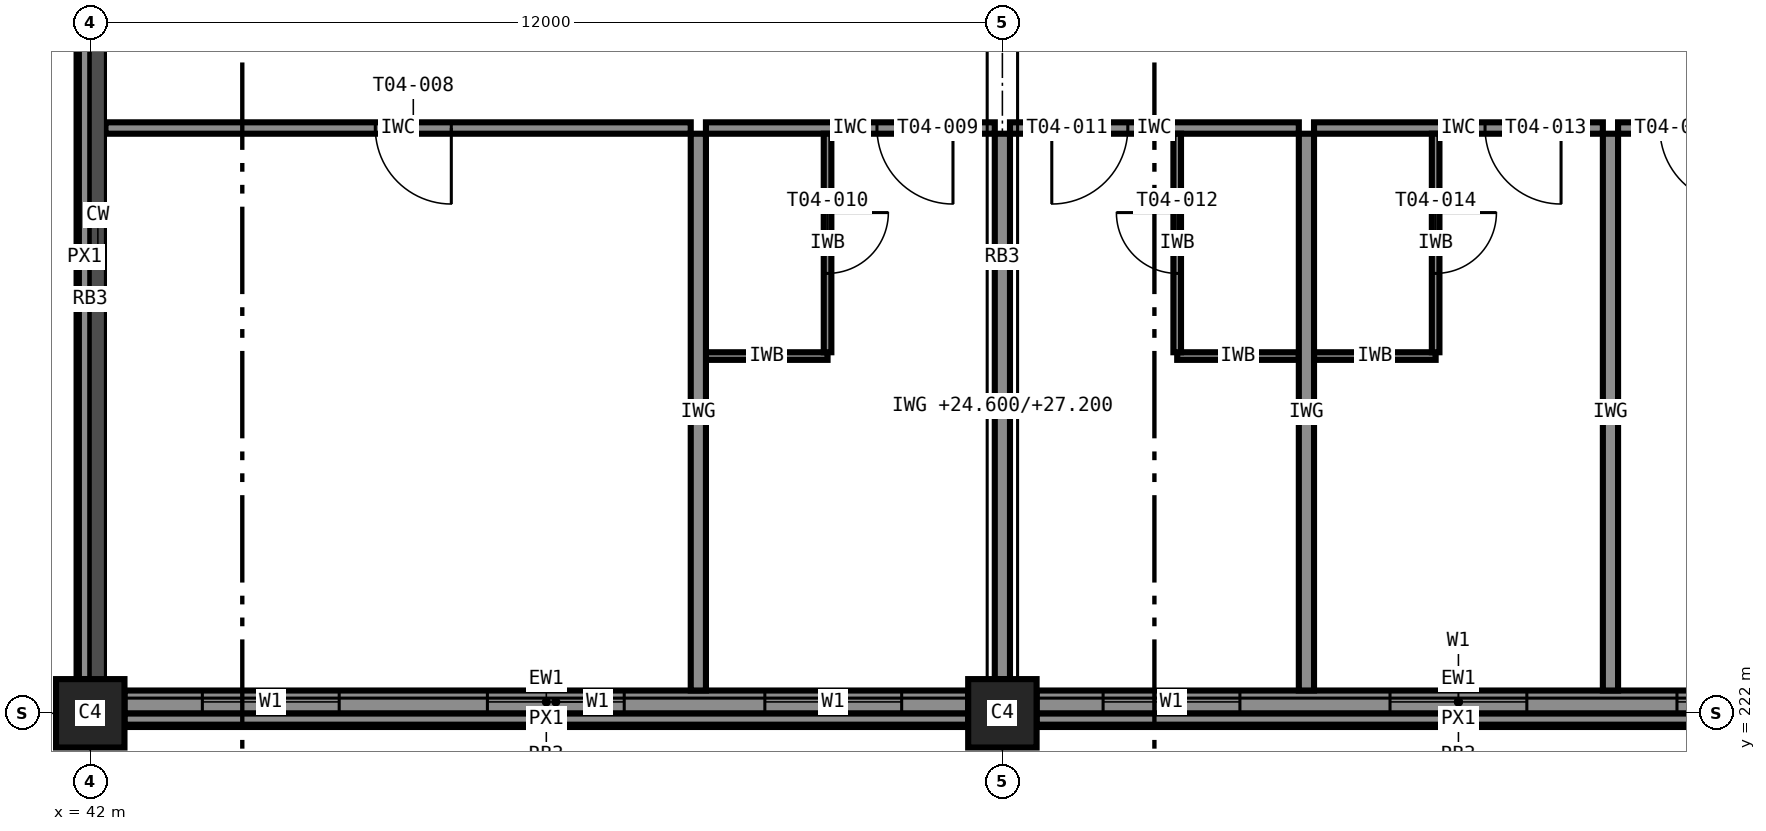
"""IFC4 building model, lengths in metres.
Left out: names, types, materials, properties, quantities, classifications, styles, units other than length and angle.
Written with IfcOpenShell. Run it as: python <this file> out.ifc"""

import sys

from ifc_helpers import new_model, si_unit, direction, frame, frame_2d, origin, origin_2d, place, context, subcontext, project, spatial, rectangle, extrude, element, fill, save


model = new_model("IFC4")
c1 = context("Model", 3, precision=1e-05, world=origin(), true_north=direction((0.0, 1.0)))
c2 = subcontext(c1, "Body", "Model", "MODEL_VIEW")
j1 = project(units=[si_unit("LENGTHUNIT", "METRE"), si_unit("PLANEANGLEUNIT", "RADIAN")], contexts=[c1])
p1 = place(None, origin())
s1 = spatial("IfcSite", under=j1, at=p1, CompositionType="ELEMENT")
p2 = place(p1, origin())
s2 = spatial("IfcBuilding", under=s1, at=p2, CompositionType="ELEMENT")
p3 = place(p2, frame((0.0, 0.0, 24.6)))
s3 = spatial("IfcBuildingStorey", under=s2, at=p3, CompositionType="ELEMENT", Elevation=24.6)
for number, where, z_axis, x_axis in (
    (1, (42.0, 222.0, 0.0), (0.0, 0.0, 1.0), (1.0, 0.0, 0.0)),
    (2, (54.0, 222.0, 0.0), (0.0, 0.0, 1.0), (1.0, 0.0, 0.0)),
):
    element("IfcColumn", number, at=place(p3, frame(where, z_axis=z_axis, x_axis=x_axis)), inside=s3, PredefinedType="COLUMN", context=c2, shape_type="SweptSolid", body=[
        extrude(rectangle(XDim=0.9, YDim=0.9, at=origin_2d()), origin(), (0.0, 0.0, 1.0), 3.6),
    ])
p4 = place(p3, frame((42.45, 222.15, 0.0), z_axis=(0.0, 0.0, 1.0), x_axis=(1.0, 0.0, 0.0)))
e3 = element("IfcWall", 3, at=p4, inside=s3, PredefinedType="STANDARD", context=c2, shape_type="SweptSolid", body=[
    extrude(rectangle(XDim=11.1, YDim=0.3, at=frame_2d((5.55, 0.0))), origin(), (0.0, 0.0, 1.0), 2.6),
])
p5 = place(p4, frame((1.025, 0.0, 0.85)))
e4 = element("IfcOpeningElement", 4, at=p5, cuts=e3, PredefinedType="OPENING", context=c2, shape_type="SweptSolid", body=[
    extrude(rectangle(XDim=1.8, YDim=1.75, at=frame_2d((0.9, 0.875))), frame((0.0, 0.16, 0.0), z_axis=(0.0, -1.0, 0.0), x_axis=(1.0, 0.0, 0.0)), (0.0, 0.0, 1.0), 0.32),
])
p6 = place(p4, frame((4.775, 0.0, 0.85)))
e5 = element("IfcOpeningElement", 5, at=p6, cuts=e3, PredefinedType="OPENING", context=c2, shape_type="SweptSolid", body=[
    extrude(rectangle(XDim=1.8, YDim=1.75, at=frame_2d((0.9, 0.875))), frame((0.0, 0.16, 0.0), z_axis=(0.0, -1.0, 0.0), x_axis=(1.0, 0.0, 0.0)), (0.0, 0.0, 1.0), 0.32),
])
p7 = place(p4, frame((8.425, 0.0, 0.85)))
e6 = element("IfcOpeningElement", 6, at=p7, cuts=e3, PredefinedType="OPENING", context=c2, shape_type="SweptSolid", body=[
    extrude(rectangle(XDim=1.8, YDim=1.75, at=frame_2d((0.9, 0.875))), frame((0.0, 0.16, 0.0), z_axis=(0.0, -1.0, 0.0), x_axis=(1.0, 0.0, 0.0)), (0.0, 0.0, 1.0), 0.32),
])
p8 = place(p3, frame((54.45, 222.15, 0.0), z_axis=(0.0, 0.0, 1.0), x_axis=(1.0, 0.0, 0.0)))
e7 = element("IfcWall", 7, at=p8, inside=s3, PredefinedType="STANDARD", context=c2, shape_type="SweptSolid", body=[
    extrude(rectangle(XDim=11.1, YDim=0.3, at=frame_2d((5.55, 0.0))), origin(), (0.0, 0.0, 1.0), 2.6),
])
p9 = place(p8, frame((0.875, 0.0, 0.85)))
e8 = element("IfcOpeningElement", 8, at=p9, cuts=e7, PredefinedType="OPENING", context=c2, shape_type="SweptSolid", body=[
    extrude(rectangle(XDim=1.8, YDim=1.75, at=frame_2d((0.9, 0.875))), frame((0.0, 0.16, 0.0), z_axis=(0.0, -1.0, 0.0), x_axis=(1.0, 0.0, 0.0)), (0.0, 0.0, 1.0), 0.32),
])
p10 = place(p8, frame((4.65, 0.0, 0.85)))
e9 = element("IfcOpeningElement", 9, at=p10, cuts=e7, PredefinedType="OPENING", context=c2, shape_type="SweptSolid", body=[
    extrude(rectangle(XDim=1.8, YDim=1.75, at=frame_2d((0.9, 0.875))), frame((0.0, 0.16, 0.0), z_axis=(0.0, -1.0, 0.0), x_axis=(1.0, 0.0, 0.0)), (0.0, 0.0, 1.0), 0.32),
])
p11 = place(p8, frame((8.425, 0.0, 0.85)))
e10 = element("IfcOpeningElement", 10, at=p11, cuts=e7, PredefinedType="OPENING", context=c2, shape_type="SweptSolid", body=[
    extrude(rectangle(XDim=1.8, YDim=1.75, at=frame_2d((0.9, 0.875))), frame((0.0, 0.16, 0.0), z_axis=(0.0, -1.0, 0.0), x_axis=(1.0, 0.0, 0.0)), (0.0, 0.0, 1.0), 0.32),
])
for number, where, z_axis, x_axis in (
    (11, (42.45, 221.925, 3.4), (0.0, 0.0, 1.0), (1.0, 0.0, 0.0)),
    (12, (54.45, 221.925, 3.4), (0.0, 0.0, 1.0), (1.0, 0.0, 0.0)),
    (13, (41.925, 233.55, 3.4), (0.0, 0.0, 1.0), (0.0, -1.0, 0.0)),
):
    element("IfcWall", number, at=place(p3, frame(where, z_axis=z_axis, x_axis=x_axis)), inside=s3, PredefinedType="STANDARD", context=c2, shape_type="SweptSolid", body=[
        extrude(rectangle(XDim=11.1, YDim=0.15, at=frame_2d((5.55, 0.0))), origin(), (0.0, 0.0, 1.0), 0.2),
    ])
p12 = place(p3, frame((49.9, 229.7, 0.0), z_axis=(0.0, 0.0, 1.0), x_axis=(-1.0, 0.0, 0.0)))
e14 = element("IfcWall", 14, at=p12, inside=s3, PredefinedType="PARTITIONING", context=c2, shape_type="SweptSolid", body=[
    extrude(rectangle(XDim=7.7, YDim=0.15, at=frame_2d((3.85, 0.0))), origin(), (0.0, 0.0, 1.0), 3.4),
])
p13 = place(p12, frame((3.15, 0.0, 0.0)))
e15 = element("IfcOpeningElement", 15, at=p13, cuts=e14, PredefinedType="OPENING", context=c2, shape_type="SweptSolid", body=[
    extrude(rectangle(XDim=1.0, YDim=2.1, at=frame_2d((0.5, 1.05))), frame((0.0, 0.085, 0.0), z_axis=(0.0, -1.0, 0.0), x_axis=(1.0, 0.0, 0.0)), (0.0, 0.0, 1.0), 0.17),
])
p14 = place(p3, frame((53.9, 229.7, 0.0), z_axis=(0.0, 0.0, 1.0), x_axis=(-1.0, 0.0, 0.0)))
e16 = element("IfcWall", 16, at=p14, inside=s3, PredefinedType="PARTITIONING", context=c2, shape_type="SweptSolid", body=[
    extrude(rectangle(XDim=3.8, YDim=0.15, at=frame_2d((1.9, 0.0))), origin(), (0.0, 0.0, 1.0), 3.4),
])
p15 = place(p14, frame((0.55, 0.0, 0.0)))
e17 = element("IfcOpeningElement", 17, at=p15, cuts=e16, PredefinedType="OPENING", context=c2, shape_type="SweptSolid", body=[
    extrude(rectangle(XDim=1.0, YDim=2.1, at=frame_2d((0.5, 1.05))), frame((0.0, 0.085, 0.0), z_axis=(0.0, -1.0, 0.0), x_axis=(1.0, 0.0, 0.0)), (0.0, 0.0, 1.0), 0.17),
])
p16 = place(p3, frame((50.1, 226.7, 0.0), z_axis=(0.0, 0.0, 1.0), x_axis=(1.0, 0.0, 0.0)))
e18 = element("IfcWall", 18, at=p16, inside=s3, PredefinedType="PARTITIONING", context=c2, shape_type="SweptSolid", body=[
    extrude(rectangle(XDim=1.6, YDim=0.1, at=frame_2d((0.8, 0.0))), origin(), (0.0, 0.0, 1.0), 3.4),
])
p17 = place(p3, frame((51.7, 229.625, 0.0), z_axis=(0.0, 0.0, 1.0), x_axis=(0.0, -1.0, 0.0)))
e19 = element("IfcWall", 19, at=p17, inside=s3, PredefinedType="PARTITIONING", context=c2, shape_type="SweptSolid", body=[
    extrude(rectangle(XDim=2.875, YDim=0.1, at=frame_2d((1.438, 0.0))), origin(), (0.0, 0.0, 1.0), 3.4),
])
p18 = place(p17, frame((1.038, 0.0, 0.0)))
e20 = element("IfcOpeningElement", 20, at=p18, cuts=e19, PredefinedType="OPENING", context=c2, shape_type="SweptSolid", body=[
    extrude(rectangle(XDim=0.8, YDim=2.1, at=frame_2d((0.4, 1.05))), frame((0.0, 0.06, 0.0), z_axis=(0.0, -1.0, 0.0), x_axis=(1.0, 0.0, 0.0)), (0.0, 0.0, 1.0), 0.12),
])
p19 = place(p3, frame((57.9, 229.7, 0.0), z_axis=(0.0, 0.0, 1.0), x_axis=(-1.0, 0.0, 0.0)))
e21 = element("IfcWall", 21, at=p19, inside=s3, PredefinedType="PARTITIONING", context=c2, shape_type="SweptSolid", body=[
    extrude(rectangle(XDim=3.8, YDim=0.15, at=frame_2d((1.9, 0.0))), origin(), (0.0, 0.0, 1.0), 3.4),
])
p20 = place(p19, frame((2.25, 0.0, 0.0)))
e22 = element("IfcOpeningElement", 22, at=p20, cuts=e21, PredefinedType="OPENING", context=c2, shape_type="SweptSolid", body=[
    extrude(rectangle(XDim=1.0, YDim=2.1, at=frame_2d((0.5, 1.05))), frame((0.0, 0.085, 0.0), z_axis=(0.0, -1.0, 0.0), x_axis=(1.0, 0.0, 0.0)), (0.0, 0.0, 1.0), 0.17),
])
p21 = place(p3, frame((56.3, 226.7, 0.0), z_axis=(0.0, 0.0, 1.0), x_axis=(1.0, 0.0, 0.0)))
e23 = element("IfcWall", 23, at=p21, inside=s3, PredefinedType="PARTITIONING", context=c2, shape_type="SweptSolid", body=[
    extrude(rectangle(XDim=1.6, YDim=0.1, at=frame_2d((0.8, 0.0))), origin(), (0.0, 0.0, 1.0), 3.4),
])
p22 = place(p3, frame((56.3, 226.75, 0.0), z_axis=(0.0, 0.0, 1.0), x_axis=(0.0, 1.0, 0.0)))
e24 = element("IfcWall", 24, at=p22, inside=s3, PredefinedType="PARTITIONING", context=c2, shape_type="SweptSolid", body=[
    extrude(rectangle(XDim=2.875, YDim=0.1, at=frame_2d((1.438, 0.0))), origin(), (0.0, 0.0, 1.0), 3.4),
])
p23 = place(p22, frame((1.038, 0.0, 0.0)))
e25 = element("IfcOpeningElement", 25, at=p23, cuts=e24, PredefinedType="OPENING", context=c2, shape_type="SweptSolid", body=[
    extrude(rectangle(XDim=0.8, YDim=2.1, at=frame_2d((0.4, 1.05))), frame((0.0, 0.06, 0.0), z_axis=(0.0, -1.0, 0.0), x_axis=(1.0, 0.0, 0.0)), (0.0, 0.0, 1.0), 0.12),
])
p24 = place(p3, frame((61.9, 229.7, 0.0), z_axis=(0.0, 0.0, 1.0), x_axis=(-1.0, 0.0, 0.0)))
e26 = element("IfcWall", 26, at=p24, inside=s3, PredefinedType="PARTITIONING", context=c2, shape_type="SweptSolid", body=[
    extrude(rectangle(XDim=3.8, YDim=0.15, at=frame_2d((1.9, 0.0))), origin(), (0.0, 0.0, 1.0), 3.4),
])
p25 = place(p24, frame((0.55, 0.0, 0.0)))
e27 = element("IfcOpeningElement", 27, at=p25, cuts=e26, PredefinedType="OPENING", context=c2, shape_type="SweptSolid", body=[
    extrude(rectangle(XDim=1.0, YDim=2.1, at=frame_2d((0.5, 1.05))), frame((0.0, 0.085, 0.0), z_axis=(0.0, -1.0, 0.0), x_axis=(1.0, 0.0, 0.0)), (0.0, 0.0, 1.0), 0.17),
])
p26 = place(p3, frame((58.1, 226.7, 0.0), z_axis=(0.0, 0.0, 1.0), x_axis=(1.0, 0.0, 0.0)))
e28 = element("IfcWall", 28, at=p26, inside=s3, PredefinedType="PARTITIONING", context=c2, shape_type="SweptSolid", body=[
    extrude(rectangle(XDim=1.6, YDim=0.1, at=frame_2d((0.8, 0.0))), origin(), (0.0, 0.0, 1.0), 3.4),
])
p27 = place(p3, frame((59.7, 229.625, 0.0), z_axis=(0.0, 0.0, 1.0), x_axis=(0.0, -1.0, 0.0)))
e29 = element("IfcWall", 29, at=p27, inside=s3, PredefinedType="PARTITIONING", context=c2, shape_type="SweptSolid", body=[
    extrude(rectangle(XDim=2.875, YDim=0.1, at=frame_2d((1.438, 0.0))), origin(), (0.0, 0.0, 1.0), 3.4),
])
p28 = place(p27, frame((1.038, 0.0, 0.0)))
e30 = element("IfcOpeningElement", 30, at=p28, cuts=e29, PredefinedType="OPENING", context=c2, shape_type="SweptSolid", body=[
    extrude(rectangle(XDim=0.8, YDim=2.1, at=frame_2d((0.4, 1.05))), frame((0.0, 0.06, 0.0), z_axis=(0.0, -1.0, 0.0), x_axis=(1.0, 0.0, 0.0)), (0.0, 0.0, 1.0), 0.12),
])
p29 = place(p3, frame((65.9, 229.7, 0.0), z_axis=(0.0, 0.0, 1.0), x_axis=(-1.0, 0.0, 0.0)))
e31 = element("IfcWall", 31, at=p29, inside=s3, PredefinedType="PARTITIONING", context=c2, shape_type="SweptSolid", body=[
    extrude(rectangle(XDim=3.8, YDim=0.15, at=frame_2d((1.9, 0.0))), origin(), (0.0, 0.0, 1.0), 3.4),
])
p30 = place(p29, frame((2.25, 0.0, 0.0)))
e32 = element("IfcOpeningElement", 32, at=p30, cuts=e31, PredefinedType="OPENING", context=c2, shape_type="SweptSolid", body=[
    extrude(rectangle(XDim=1.0, YDim=2.1, at=frame_2d((0.5, 1.05))), frame((0.0, 0.085, 0.0), z_axis=(0.0, -1.0, 0.0), x_axis=(1.0, 0.0, 0.0)), (0.0, 0.0, 1.0), 0.17),
])
p31 = place(p3, frame((50.0, 222.3, 0.0), z_axis=(0.0, 0.0, 1.0), x_axis=(0.0, 1.0, 0.0)))
e33 = element("IfcWall", 33, at=p31, inside=s3, PredefinedType="PARTITIONING", context=c2, shape_type="SweptSolid", body=[
    extrude(rectangle(XDim=7.325, YDim=0.2, at=frame_2d((3.663, 0.0))), origin(), (0.0, 0.0, 1.0), 3.4),
])
p32 = place(p3, frame((54.0, 222.45, 0.0), z_axis=(0.0, 0.0, 1.0), x_axis=(0.0, 1.0, 0.0)))
e34 = element("IfcWall", 34, at=p32, inside=s3, PredefinedType="PARTITIONING", context=c2, shape_type="SweptSolid", body=[
    extrude(rectangle(XDim=7.175, YDim=0.2, at=frame_2d((3.587, 0.0))), origin(), (0.0, 0.0, 1.0), 2.6),
])
for number, where, z_axis, x_axis in (
    (35, (58.0, 222.3, 0.0), (0.0, 0.0, 1.0), (0.0, 1.0, 0.0)),
    (36, (62.0, 222.3, 0.0), (0.0, 0.0, 1.0), (0.0, 1.0, 0.0)),
):
    element("IfcWall", number, at=place(p3, frame(where, z_axis=z_axis, x_axis=x_axis)), inside=s3, PredefinedType="PARTITIONING", context=c2, shape_type="SweptSolid", body=[
        extrude(rectangle(XDim=7.325, YDim=0.2, at=frame_2d((3.663, 0.0))), origin(), (0.0, 0.0, 1.0), 3.4),
    ])
p33 = place(p5, origin())
e37 = element("IfcWindow", 37, at=p33, inside=s3, PartitioningType="SINGLE_PANEL", PredefinedType="WINDOW", context=c2, shape_type="SweptSolid", body=[
    extrude(rectangle(XDim=1.8, YDim=1.75, at=frame_2d((0.9, 0.875))), frame((0.0, 0.03, 0.0), z_axis=(0.0, -1.0, 0.0), x_axis=(1.0, 0.0, 0.0)), (0.0, 0.0, 1.0), 0.06),
])
fill(e4, e37)
p34 = place(p6, origin())
e38 = element("IfcWindow", 38, at=p34, inside=s3, PartitioningType="SINGLE_PANEL", PredefinedType="WINDOW", context=c2, shape_type="SweptSolid", body=[
    extrude(rectangle(XDim=1.8, YDim=1.75, at=frame_2d((0.9, 0.875))), frame((0.0, 0.03, 0.0), z_axis=(0.0, -1.0, 0.0), x_axis=(1.0, 0.0, 0.0)), (0.0, 0.0, 1.0), 0.06),
])
fill(e5, e38)
p35 = place(p7, origin())
e39 = element("IfcWindow", 39, at=p35, inside=s3, PartitioningType="SINGLE_PANEL", PredefinedType="WINDOW", context=c2, shape_type="SweptSolid", body=[
    extrude(rectangle(XDim=1.8, YDim=1.75, at=frame_2d((0.9, 0.875))), frame((0.0, 0.03, 0.0), z_axis=(0.0, -1.0, 0.0), x_axis=(1.0, 0.0, 0.0)), (0.0, 0.0, 1.0), 0.06),
])
fill(e6, e39)
p36 = place(p9, origin())
e40 = element("IfcWindow", 40, at=p36, inside=s3, PartitioningType="SINGLE_PANEL", PredefinedType="WINDOW", context=c2, shape_type="SweptSolid", body=[
    extrude(rectangle(XDim=1.8, YDim=1.75, at=frame_2d((0.9, 0.875))), frame((0.0, 0.03, 0.0), z_axis=(0.0, -1.0, 0.0), x_axis=(1.0, 0.0, 0.0)), (0.0, 0.0, 1.0), 0.06),
])
fill(e8, e40)
p37 = place(p10, origin())
e41 = element("IfcWindow", 41, at=p37, inside=s3, PartitioningType="SINGLE_PANEL", PredefinedType="WINDOW", context=c2, shape_type="SweptSolid", body=[
    extrude(rectangle(XDim=1.8, YDim=1.75, at=frame_2d((0.9, 0.875))), frame((0.0, 0.03, 0.0), z_axis=(0.0, -1.0, 0.0), x_axis=(1.0, 0.0, 0.0)), (0.0, 0.0, 1.0), 0.06),
])
fill(e9, e41)
p38 = place(p11, origin())
e42 = element("IfcWindow", 42, at=p38, inside=s3, PartitioningType="SINGLE_PANEL", PredefinedType="WINDOW", context=c2, shape_type="SweptSolid", body=[
    extrude(rectangle(XDim=1.8, YDim=1.75, at=frame_2d((0.9, 0.875))), frame((0.0, 0.03, 0.0), z_axis=(0.0, -1.0, 0.0), x_axis=(1.0, 0.0, 0.0)), (0.0, 0.0, 1.0), 0.06),
])
fill(e10, e42)
p39 = place(p13, origin())
e43 = element("IfcDoor", 43, at=p39, inside=s3, OperationType="SINGLE_SWING_LEFT", PredefinedType="DOOR", context=c2, shape_type="SweptSolid", body=[
    extrude(rectangle(XDim=1.0, YDim=2.1, at=frame_2d((0.5, 1.05))), frame((0.0, 0.025, 0.0), z_axis=(0.0, -1.0, 0.0), x_axis=(1.0, 0.0, 0.0)), (0.0, 0.0, 1.0), 0.05),
])
fill(e15, e43)
p40 = place(p15, origin())
e44 = element("IfcDoor", 44, at=p40, inside=s3, OperationType="SINGLE_SWING_LEFT", PredefinedType="DOOR", context=c2, shape_type="SweptSolid", body=[
    extrude(rectangle(XDim=1.0, YDim=2.1, at=frame_2d((0.5, 1.05))), frame((0.0, 0.025, 0.0), z_axis=(0.0, -1.0, 0.0), x_axis=(1.0, 0.0, 0.0)), (0.0, 0.0, 1.0), 0.05),
])
fill(e17, e44)
p41 = place(p18, origin())
e45 = element("IfcDoor", 45, at=p41, inside=s3, OperationType="SINGLE_SWING_LEFT", PredefinedType="DOOR", context=c2, shape_type="SweptSolid", body=[
    extrude(rectangle(XDim=0.8, YDim=2.1, at=frame_2d((0.4, 1.05))), frame((0.0, 0.025, 0.0), z_axis=(0.0, -1.0, 0.0), x_axis=(1.0, 0.0, 0.0)), (0.0, 0.0, 1.0), 0.05),
])
fill(e20, e45)
p42 = place(p20, origin())
e46 = element("IfcDoor", 46, at=p42, inside=s3, OperationType="SINGLE_SWING_RIGHT", PredefinedType="DOOR", context=c2, shape_type="SweptSolid", body=[
    extrude(rectangle(XDim=1.0, YDim=2.1, at=frame_2d((0.5, 1.05))), frame((0.0, 0.025, 0.0), z_axis=(0.0, -1.0, 0.0), x_axis=(1.0, 0.0, 0.0)), (0.0, 0.0, 1.0), 0.05),
])
fill(e22, e46)
p43 = place(p23, origin())
e47 = element("IfcDoor", 47, at=p43, inside=s3, OperationType="SINGLE_SWING_RIGHT", PredefinedType="DOOR", context=c2, shape_type="SweptSolid", body=[
    extrude(rectangle(XDim=0.8, YDim=2.1, at=frame_2d((0.4, 1.05))), frame((0.0, 0.025, 0.0), z_axis=(0.0, -1.0, 0.0), x_axis=(1.0, 0.0, 0.0)), (0.0, 0.0, 1.0), 0.05),
])
fill(e25, e47)
p44 = place(p25, origin())
e48 = element("IfcDoor", 48, at=p44, inside=s3, OperationType="SINGLE_SWING_LEFT", PredefinedType="DOOR", context=c2, shape_type="SweptSolid", body=[
    extrude(rectangle(XDim=1.0, YDim=2.1, at=frame_2d((0.5, 1.05))), frame((0.0, 0.025, 0.0), z_axis=(0.0, -1.0, 0.0), x_axis=(1.0, 0.0, 0.0)), (0.0, 0.0, 1.0), 0.05),
])
fill(e27, e48)
p45 = place(p28, origin())
e49 = element("IfcDoor", 49, at=p45, inside=s3, OperationType="SINGLE_SWING_LEFT", PredefinedType="DOOR", context=c2, shape_type="SweptSolid", body=[
    extrude(rectangle(XDim=0.8, YDim=2.1, at=frame_2d((0.4, 1.05))), frame((0.0, 0.025, 0.0), z_axis=(0.0, -1.0, 0.0), x_axis=(1.0, 0.0, 0.0)), (0.0, 0.0, 1.0), 0.05),
])
fill(e30, e49)
p46 = place(p30, origin())
e50 = element("IfcDoor", 50, at=p46, inside=s3, OperationType="SINGLE_SWING_LEFT", PredefinedType="DOOR", context=c2, shape_type="SweptSolid", body=[
    extrude(rectangle(XDim=1.0, YDim=2.1, at=frame_2d((0.5, 1.05))), frame((0.0, 0.025, 0.0), z_axis=(0.0, -1.0, 0.0), x_axis=(1.0, 0.0, 0.0)), (0.0, 0.0, 1.0), 0.05),
])
fill(e32, e50)
save(model, sys.argv[1])
